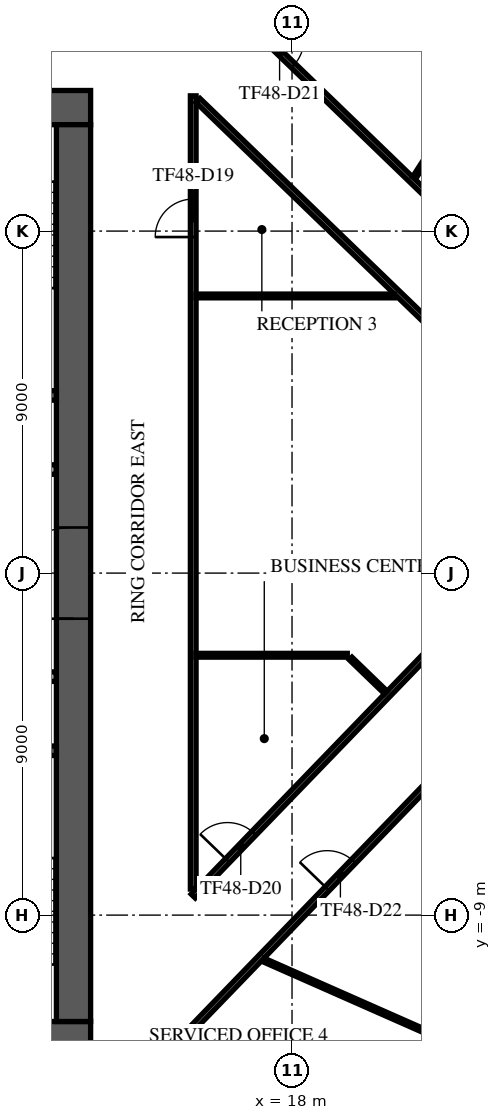
"""IFC4 building model, lengths in metres.
Left out: names, types, materials, properties, quantities, classifications, styles, units other than length and angle.
Written with IfcOpenShell. Run it as: python <this file> out.ifc"""

import sys

from ifc_helpers import new_model, si_unit, direction, frame, frame_2d, origin, place, context, subcontext, project, spatial, rectangle, extrude, element, fill, save


model = new_model("IFC4")
c1 = context("Model", 3, precision=1e-05, world=origin(), true_north=direction((0.0, 1.0)))
c2 = subcontext(c1, "Body", "Model", "MODEL_VIEW")
j1 = project(units=[si_unit("LENGTHUNIT", "METRE"), si_unit("PLANEANGLEUNIT", "RADIAN")], contexts=[c1])
p1 = place(None, origin())
s1 = spatial("IfcSite", under=j1, at=p1, CompositionType="ELEMENT")
p2 = place(p1, origin())
s2 = spatial("IfcBuilding", under=s1, at=p2, CompositionType="ELEMENT")
p3 = place(p2, frame((0.0, 0.0, 205.3)))
s3 = spatial("IfcBuildingStorey", under=s2, at=p3, CompositionType="ELEMENT", Elevation=205.3)
p4 = place(p3, frame((-12.7, 12.25, 0.0), z_axis=(0.0, 0.0, 1.0), x_axis=(1.0, 0.0, 0.0)))
e1 = element("IfcWall", 1, at=p4, inside=s3, PredefinedType="SHEAR", context=c2, shape_type="SweptSolid", body=[
    extrude(rectangle(XDim=25.4, YDim=0.9, at=frame_2d((12.7, 0.0))), origin(), (0.0, 0.0, 1.0), 3.62),
])
p5 = place(p4, frame((11.5, 0.0, 0.0)))
e2 = element("IfcOpeningElement", 2, at=p5, cuts=e1, PredefinedType="OPENING", context=c2, shape_type="SweptSolid", body=[
    extrude(rectangle(XDim=2.4, YDim=2.4, at=frame_2d((1.2, 1.2))), frame((0.0, 0.46, 0.0), z_axis=(0.0, -1.0, 0.0), x_axis=(1.0, 0.0, 0.0)), (0.0, 0.0, 1.0), 0.92),
])
p6 = place(p4, frame((22.325, 0.0, 0.0)))
e3 = element("IfcOpeningElement", 3, at=p6, cuts=e1, PredefinedType="OPENING", context=c2, shape_type="SweptSolid", body=[
    extrude(rectangle(XDim=1.2, YDim=2.1, at=frame_2d((0.6, 1.05))), frame((0.0, 0.46, 0.0), z_axis=(0.0, -1.0, 0.0), x_axis=(1.0, 0.0, 0.0)), (0.0, 0.0, 1.0), 0.92),
])
p7 = place(p4, frame((1.3, 0.0, 0.0)))
e4 = element("IfcOpeningElement", 4, at=p7, cuts=e1, PredefinedType="OPENING", context=c2, shape_type="SweptSolid", body=[
    extrude(rectangle(XDim=1.0, YDim=2.1, at=frame_2d((0.5, 1.05))), frame((0.0, 0.46, 0.0), z_axis=(0.0, -1.0, 0.0), x_axis=(1.0, 0.0, 0.0)), (0.0, 0.0, 1.0), 0.92),
])
p8 = place(p3, frame((-12.7, -12.25, 0.0), z_axis=(0.0, 0.0, 1.0), x_axis=(1.0, 0.0, 0.0)))
e5 = element("IfcWall", 5, at=p8, inside=s3, PredefinedType="SHEAR", context=c2, shape_type="SweptSolid", body=[
    extrude(rectangle(XDim=25.4, YDim=0.9, at=frame_2d((12.7, 0.0))), origin(), (0.0, 0.0, 1.0), 3.62),
])
p9 = place(p8, frame((7.6, 0.0, 0.0)))
e6 = element("IfcOpeningElement", 6, at=p9, cuts=e5, PredefinedType="OPENING", context=c2, shape_type="SweptSolid", body=[
    extrude(rectangle(XDim=2.0, YDim=2.1, at=frame_2d((1.0, 1.05))), frame((0.0, 0.46, 0.0), z_axis=(0.0, -1.0, 0.0), x_axis=(1.0, 0.0, 0.0)), (0.0, 0.0, 1.0), 0.92),
])
p10 = place(p8, frame((17.725, 0.0, 0.0)))
e7 = element("IfcOpeningElement", 7, at=p10, cuts=e5, PredefinedType="OPENING", context=c2, shape_type="SweptSolid", body=[
    extrude(rectangle(XDim=1.2, YDim=2.1, at=frame_2d((0.6, 1.05))), frame((0.0, 0.46, 0.0), z_axis=(0.0, -1.0, 0.0), x_axis=(1.0, 0.0, 0.0)), (0.0, 0.0, 1.0), 0.92),
])
p11 = place(p8, frame((1.875, 0.0, 0.0)))
e8 = element("IfcOpeningElement", 8, at=p11, cuts=e5, PredefinedType="OPENING", context=c2, shape_type="SweptSolid", body=[
    extrude(rectangle(XDim=1.2, YDim=2.1, at=frame_2d((0.6, 1.05))), frame((0.0, 0.46, 0.0), z_axis=(0.0, -1.0, 0.0), x_axis=(1.0, 0.0, 0.0)), (0.0, 0.0, 1.0), 0.92),
])
p12 = place(p8, frame((22.325, 0.0, 0.0)))
e9 = element("IfcOpeningElement", 9, at=p12, cuts=e5, PredefinedType="OPENING", context=c2, shape_type="SweptSolid", body=[
    extrude(rectangle(XDim=1.2, YDim=2.1, at=frame_2d((0.6, 1.05))), frame((0.0, 0.46, 0.0), z_axis=(0.0, -1.0, 0.0), x_axis=(1.0, 0.0, 0.0)), (0.0, 0.0, 1.0), 0.92),
])
p13 = place(p3, frame((12.25, -11.8, 0.0), z_axis=(0.0, 0.0, 1.0), x_axis=(0.0, 1.0, 0.0)))
e10 = element("IfcWall", 10, at=p13, inside=s3, PredefinedType="SHEAR", context=c2, shape_type="SweptSolid", body=[
    extrude(rectangle(XDim=23.6, YDim=0.9, at=frame_2d((11.8, 0.0))), origin(), (0.0, 0.0, 1.0), 3.62),
])
p14 = place(p13, frame((10.6, 0.0, 0.0)))
e11 = element("IfcOpeningElement", 11, at=p14, cuts=e10, PredefinedType="OPENING", context=c2, shape_type="SweptSolid", body=[
    extrude(rectangle(XDim=2.4, YDim=2.4, at=frame_2d((1.2, 1.2))), frame((0.0, 0.46, 0.0), z_axis=(0.0, -1.0, 0.0), x_axis=(1.0, 0.0, 0.0)), (0.0, 0.0, 1.0), 0.92),
])
for number, where, z_axis, x_axis in (
    (12, (8.65, 4.675, 0.0), (0.0, 0.0, 1.0), (1.0, 0.0, 0.0)),
    (13, (8.65, -4.675, 0.0), (0.0, 0.0, 1.0), (1.0, 0.0, 0.0)),
):
    element("IfcWall", number, at=place(p3, frame(where, z_axis=z_axis, x_axis=x_axis)), inside=s3, PredefinedType="SOLIDWALL", context=c2, shape_type="SweptSolid", body=[
        extrude(rectangle(XDim=3.15, YDim=0.25, at=frame_2d((1.575, 0.0))), origin(), (0.0, 0.0, 1.0), 3.62),
    ])
p15 = place(p3, frame((5.63, -2.725, 0.0), z_axis=(0.0, 0.0, 1.0), x_axis=(1.0, 0.0, 0.0)))
e14 = element("IfcWall", 14, at=p15, inside=s3, PredefinedType="PARTITIONING", context=c2, shape_type="SweptSolid", body=[
    extrude(rectangle(XDim=6.165, YDim=0.25, at=frame_2d((3.083, 0.0))), origin(), (0.0, 0.0, 1.0), 3.62),
])
p16 = place(p15, frame((0.745, 0.0, 0.0)))
e15 = element("IfcOpeningElement", 15, at=p16, cuts=e14, PredefinedType="OPENING", context=c2, shape_type="SweptSolid", body=[
    extrude(rectangle(XDim=1.0, YDim=2.1, at=frame_2d((0.5, 1.05))), frame((0.0, 0.135, 0.0), z_axis=(0.0, -1.0, 0.0), x_axis=(1.0, 0.0, 0.0)), (0.0, 0.0, 1.0), 0.27),
])
p17 = place(p15, frame((3.92, 0.0, 0.0)))
e16 = element("IfcOpeningElement", 16, at=p17, cuts=e14, PredefinedType="OPENING", context=c2, shape_type="SweptSolid", body=[
    extrude(rectangle(XDim=0.9, YDim=2.1, at=frame_2d((0.45, 1.05))), frame((0.0, 0.135, 0.0), z_axis=(0.0, -1.0, 0.0), x_axis=(1.0, 0.0, 0.0)), (0.0, 0.0, 1.0), 0.27),
])
p18 = place(p3, frame((8.38, 2.725, 0.0), z_axis=(0.0, 0.0, 1.0), x_axis=(1.0, 0.0, 0.0)))
e17 = element("IfcWall", 17, at=p18, inside=s3, PredefinedType="PARTITIONING", context=c2, shape_type="SweptSolid", body=[
    extrude(rectangle(XDim=3.415, YDim=0.25, at=frame_2d((1.708, 0.0))), origin(), (0.0, 0.0, 1.0), 3.62),
])
p19 = place(p18, frame((1.17, 0.0, 0.0)))
e18 = element("IfcOpeningElement", 18, at=p19, cuts=e17, PredefinedType="OPENING", context=c2, shape_type="SweptSolid", body=[
    extrude(rectangle(XDim=0.9, YDim=2.1, at=frame_2d((0.45, 1.05))), frame((0.0, 0.135, 0.0), z_axis=(0.0, -1.0, 0.0), x_axis=(1.0, 0.0, 0.0)), (0.0, 0.0, 1.0), 0.27),
])
p20 = place(p3, frame((0.749, -34.782, 0.0), z_axis=(0.0, 0.0, 1.0), x_axis=(0.694657553534, 0.719340589233, 0.0)))
e19 = element("IfcWall", 19, at=p20, inside=s3, PredefinedType="STANDARD", context=c2, shape_type="SweptSolid", body=[
    extrude(rectangle(XDim=49.0, YDim=0.6, at=frame_2d((24.5, 0.0))), origin(), (0.0, 0.0, 1.0), 3.62),
])
p21 = place(p20, frame((1.227, 0.0, 0.9)))
e20 = element("IfcOpeningElement", 20, at=p21, cuts=e19, PredefinedType="OPENING", context=c2, shape_type="SweptSolid", body=[
    extrude(rectangle(XDim=2.0, YDim=2.1, at=frame_2d((1.0, 1.05))), frame((0.0, 0.31, 0.0), z_axis=(0.0, -1.0, 0.0), x_axis=(1.0, 0.0, 0.0)), (0.0, 0.0, 1.0), 0.62),
])
p22 = place(p20, frame((5.682, 0.0, 0.9)))
e21 = element("IfcOpeningElement", 21, at=p22, cuts=e19, PredefinedType="OPENING", context=c2, shape_type="SweptSolid", body=[
    extrude(rectangle(XDim=2.0, YDim=2.1, at=frame_2d((1.0, 1.05))), frame((0.0, 0.31, 0.0), z_axis=(0.0, -1.0, 0.0), x_axis=(1.0, 0.0, 0.0)), (0.0, 0.0, 1.0), 0.62),
])
p23 = place(p20, frame((10.136, 0.0, 0.9)))
e22 = element("IfcOpeningElement", 22, at=p23, cuts=e19, PredefinedType="OPENING", context=c2, shape_type="SweptSolid", body=[
    extrude(rectangle(XDim=2.0, YDim=2.1, at=frame_2d((1.0, 1.05))), frame((0.0, 0.31, 0.0), z_axis=(0.0, -1.0, 0.0), x_axis=(1.0, 0.0, 0.0)), (0.0, 0.0, 1.0), 0.62),
])
p24 = place(p20, frame((14.591, 0.0, 0.9)))
e23 = element("IfcOpeningElement", 23, at=p24, cuts=e19, PredefinedType="OPENING", context=c2, shape_type="SweptSolid", body=[
    extrude(rectangle(XDim=2.0, YDim=2.1, at=frame_2d((1.0, 1.05))), frame((0.0, 0.31, 0.0), z_axis=(0.0, -1.0, 0.0), x_axis=(1.0, 0.0, 0.0)), (0.0, 0.0, 1.0), 0.62),
])
p25 = place(p20, frame((19.045, 0.0, 0.9)))
e24 = element("IfcOpeningElement", 24, at=p25, cuts=e19, PredefinedType="OPENING", context=c2, shape_type="SweptSolid", body=[
    extrude(rectangle(XDim=2.0, YDim=2.1, at=frame_2d((1.0, 1.05))), frame((0.0, 0.31, 0.0), z_axis=(0.0, -1.0, 0.0), x_axis=(1.0, 0.0, 0.0)), (0.0, 0.0, 1.0), 0.62),
])
p26 = place(p20, frame((23.5, 0.0, 0.9)))
e25 = element("IfcOpeningElement", 25, at=p26, cuts=e19, PredefinedType="OPENING", context=c2, shape_type="SweptSolid", body=[
    extrude(rectangle(XDim=2.0, YDim=2.1, at=frame_2d((1.0, 1.05))), frame((0.0, 0.31, 0.0), z_axis=(0.0, -1.0, 0.0), x_axis=(1.0, 0.0, 0.0)), (0.0, 0.0, 1.0), 0.62),
])
p27 = place(p20, frame((27.955, 0.0, 0.9)))
e26 = element("IfcOpeningElement", 26, at=p27, cuts=e19, PredefinedType="OPENING", context=c2, shape_type="SweptSolid", body=[
    extrude(rectangle(XDim=2.0, YDim=2.1, at=frame_2d((1.0, 1.05))), frame((0.0, 0.31, 0.0), z_axis=(0.0, -1.0, 0.0), x_axis=(1.0, 0.0, 0.0)), (0.0, 0.0, 1.0), 0.62),
])
p28 = place(p20, frame((32.409, 0.0, 0.9)))
e27 = element("IfcOpeningElement", 27, at=p28, cuts=e19, PredefinedType="OPENING", context=c2, shape_type="SweptSolid", body=[
    extrude(rectangle(XDim=2.0, YDim=2.1, at=frame_2d((1.0, 1.05))), frame((0.0, 0.31, 0.0), z_axis=(0.0, -1.0, 0.0), x_axis=(1.0, 0.0, 0.0)), (0.0, 0.0, 1.0), 0.62),
])
p29 = place(p20, frame((36.864, 0.0, 0.9)))
e28 = element("IfcOpeningElement", 28, at=p29, cuts=e19, PredefinedType="OPENING", context=c2, shape_type="SweptSolid", body=[
    extrude(rectangle(XDim=2.0, YDim=2.1, at=frame_2d((1.0, 1.05))), frame((0.0, 0.31, 0.0), z_axis=(0.0, -1.0, 0.0), x_axis=(1.0, 0.0, 0.0)), (0.0, 0.0, 1.0), 0.62),
])
p30 = place(p20, frame((41.318, 0.0, 0.9)))
e29 = element("IfcOpeningElement", 29, at=p30, cuts=e19, PredefinedType="OPENING", context=c2, shape_type="SweptSolid", body=[
    extrude(rectangle(XDim=2.0, YDim=2.1, at=frame_2d((1.0, 1.05))), frame((0.0, 0.31, 0.0), z_axis=(0.0, -1.0, 0.0), x_axis=(1.0, 0.0, 0.0)), (0.0, 0.0, 1.0), 0.62),
])
p31 = place(p20, frame((45.773, 0.0, 0.9)))
e30 = element("IfcOpeningElement", 30, at=p31, cuts=e19, PredefinedType="OPENING", context=c2, shape_type="SweptSolid", body=[
    extrude(rectangle(XDim=2.0, YDim=2.1, at=frame_2d((1.0, 1.05))), frame((0.0, 0.31, 0.0), z_axis=(0.0, -1.0, 0.0), x_axis=(1.0, 0.0, 0.0)), (0.0, 0.0, 1.0), 0.62),
])
p32 = place(p3, frame((34.658, 7.819, 0.0), z_axis=(0.0, 0.0, 1.0), x_axis=(-0.719340729741, 0.694657408034, 0.0)))
e31 = element("IfcWall", 31, at=p32, inside=s3, PredefinedType="STANDARD", context=c2, shape_type="SweptSolid", body=[
    extrude(rectangle(XDim=39.0, YDim=0.6, at=frame_2d((19.5, 0.0))), origin(), (0.0, 0.0, 1.0), 3.62),
])
p33 = place(p32, frame((1.217, 0.0, 0.9)))
e32 = element("IfcOpeningElement", 32, at=p33, cuts=e31, PredefinedType="OPENING", context=c2, shape_type="SweptSolid", body=[
    extrude(rectangle(XDim=1.9, YDim=2.1, at=frame_2d((0.95, 1.05))), frame((0.0, 0.31, 0.0), z_axis=(0.0, -1.0, 0.0), x_axis=(1.0, 0.0, 0.0)), (0.0, 0.0, 1.0), 0.62),
])
p34 = place(p32, frame((5.55, 0.0, 0.9)))
e33 = element("IfcOpeningElement", 33, at=p34, cuts=e31, PredefinedType="OPENING", context=c2, shape_type="SweptSolid", body=[
    extrude(rectangle(XDim=1.9, YDim=2.1, at=frame_2d((0.95, 1.05))), frame((0.0, 0.31, 0.0), z_axis=(0.0, -1.0, 0.0), x_axis=(1.0, 0.0, 0.0)), (0.0, 0.0, 1.0), 0.62),
])
p35 = place(p32, frame((9.883, 0.0, 0.9)))
e34 = element("IfcOpeningElement", 34, at=p35, cuts=e31, PredefinedType="OPENING", context=c2, shape_type="SweptSolid", body=[
    extrude(rectangle(XDim=1.9, YDim=2.1, at=frame_2d((0.95, 1.05))), frame((0.0, 0.31, 0.0), z_axis=(0.0, -1.0, 0.0), x_axis=(1.0, 0.0, 0.0)), (0.0, 0.0, 1.0), 0.62),
])
p36 = place(p32, frame((14.217, 0.0, 0.9)))
e35 = element("IfcOpeningElement", 35, at=p36, cuts=e31, PredefinedType="OPENING", context=c2, shape_type="SweptSolid", body=[
    extrude(rectangle(XDim=1.9, YDim=2.1, at=frame_2d((0.95, 1.05))), frame((0.0, 0.31, 0.0), z_axis=(0.0, -1.0, 0.0), x_axis=(1.0, 0.0, 0.0)), (0.0, 0.0, 1.0), 0.62),
])
p37 = place(p32, frame((18.55, 0.0, 0.9)))
e36 = element("IfcOpeningElement", 36, at=p37, cuts=e31, PredefinedType="OPENING", context=c2, shape_type="SweptSolid", body=[
    extrude(rectangle(XDim=1.9, YDim=2.1, at=frame_2d((0.95, 1.05))), frame((0.0, 0.31, 0.0), z_axis=(0.0, -1.0, 0.0), x_axis=(1.0, 0.0, 0.0)), (0.0, 0.0, 1.0), 0.62),
])
p38 = place(p32, frame((22.883, 0.0, 0.9)))
e37 = element("IfcOpeningElement", 37, at=p38, cuts=e31, PredefinedType="OPENING", context=c2, shape_type="SweptSolid", body=[
    extrude(rectangle(XDim=1.9, YDim=2.1, at=frame_2d((0.95, 1.05))), frame((0.0, 0.31, 0.0), z_axis=(0.0, -1.0, 0.0), x_axis=(1.0, 0.0, 0.0)), (0.0, 0.0, 1.0), 0.62),
])
p39 = place(p32, frame((27.217, 0.0, 0.9)))
e38 = element("IfcOpeningElement", 38, at=p39, cuts=e31, PredefinedType="OPENING", context=c2, shape_type="SweptSolid", body=[
    extrude(rectangle(XDim=1.9, YDim=2.1, at=frame_2d((0.95, 1.05))), frame((0.0, 0.31, 0.0), z_axis=(0.0, -1.0, 0.0), x_axis=(1.0, 0.0, 0.0)), (0.0, 0.0, 1.0), 0.62),
])
p40 = place(p32, frame((31.55, 0.0, 0.9)))
e39 = element("IfcOpeningElement", 39, at=p40, cuts=e31, PredefinedType="OPENING", context=c2, shape_type="SweptSolid", body=[
    extrude(rectangle(XDim=1.9, YDim=2.1, at=frame_2d((0.95, 1.05))), frame((0.0, 0.31, 0.0), z_axis=(0.0, -1.0, 0.0), x_axis=(1.0, 0.0, 0.0)), (0.0, 0.0, 1.0), 0.62),
])
p41 = place(p32, frame((35.883, 0.0, 0.9)))
e40 = element("IfcOpeningElement", 40, at=p41, cuts=e31, PredefinedType="OPENING", context=c2, shape_type="SweptSolid", body=[
    extrude(rectangle(XDim=1.9, YDim=2.1, at=frame_2d((0.95, 1.05))), frame((0.0, 0.31, 0.0), z_axis=(0.0, -1.0, 0.0), x_axis=(1.0, 0.0, 0.0)), (0.0, 0.0, 1.0), 0.62),
])
p42 = place(p3, frame((0.977, -26.89, 0.0), z_axis=(0.0, 0.0, 1.0), x_axis=(0.694659509326, 0.719338700546, 0.0)))
e41 = element("IfcWall", 41, at=p42, inside=s3, PredefinedType="PARTITIONING", context=c2, shape_type="SweptSolid", body=[
    extrude(rectangle(XDim=37.404, YDim=0.15, at=frame_2d((18.702, 0.0))), origin(), (0.0, 0.0, 1.0), 3.17),
])
p43 = place(p42, frame((10.017, 0.0, 0.0)))
e42 = element("IfcOpeningElement", 42, at=p43, cuts=e41, PredefinedType="OPENING", context=c2, shape_type="SweptSolid", body=[
    extrude(rectangle(XDim=1.0, YDim=2.1, at=frame_2d((0.5, 1.05))), frame((0.0, 0.085, 0.0), z_axis=(0.0, -1.0, 0.0), x_axis=(1.0, 0.0, 0.0)), (0.0, 0.0, 1.0), 0.17),
])
p44 = place(p42, frame((16.416, 0.0, 0.0)))
e43 = element("IfcOpeningElement", 43, at=p44, cuts=e41, PredefinedType="OPENING", context=c2, shape_type="SweptSolid", body=[
    extrude(rectangle(XDim=1.0, YDim=2.1, at=frame_2d((0.5, 1.05))), frame((0.0, 0.085, 0.0), z_axis=(0.0, -1.0, 0.0), x_axis=(1.0, 0.0, 0.0)), (0.0, 0.0, 1.0), 0.17),
])
p45 = place(p42, frame((25.838, 0.0, 0.0)))
e44 = element("IfcOpeningElement", 44, at=p45, cuts=e41, PredefinedType="OPENING", context=c2, shape_type="SweptSolid", body=[
    extrude(rectangle(XDim=1.0, YDim=2.1, at=frame_2d((0.5, 1.05))), frame((0.0, 0.085, 0.0), z_axis=(0.0, -1.0, 0.0), x_axis=(1.0, 0.0, 0.0)), (0.0, 0.0, 1.0), 0.17),
])
p46 = place(p42, frame((31.566, 0.0, 0.0)))
e45 = element("IfcOpeningElement", 45, at=p46, cuts=e41, PredefinedType="OPENING", context=c2, shape_type="SweptSolid", body=[
    extrude(rectangle(XDim=1.0, YDim=2.1, at=frame_2d((0.5, 1.05))), frame((0.0, 0.085, 0.0), z_axis=(0.0, -1.0, 0.0), x_axis=(1.0, 0.0, 0.0)), (0.0, 0.0, 1.0), 0.17),
])
p47 = place(p3, frame((5.597, 25.362, 0.0), z_axis=(0.0, 0.0, 1.0), x_axis=(0.719350067003, -0.69464773886, 0.0)))
e46 = element("IfcWall", 46, at=p47, inside=s3, PredefinedType="PARTITIONING", context=c2, shape_type="SweptSolid", body=[
    extrude(rectangle(XDim=27.258, YDim=0.15, at=frame_2d((13.629, 0.0))), origin(), (0.0, 0.0, 1.0), 3.17),
])
p48 = place(p47, frame((11.017, 0.0, 0.0)))
e47 = element("IfcOpeningElement", 47, at=p48, cuts=e46, PredefinedType="OPENING", context=c2, shape_type="SweptSolid", body=[
    extrude(rectangle(XDim=1.0, YDim=2.1, at=frame_2d((0.5, 1.05))), frame((0.0, 0.085, 0.0), z_axis=(0.0, -1.0, 0.0), x_axis=(1.0, 0.0, 0.0)), (0.0, 0.0, 1.0), 0.17),
])
p49 = place(p47, frame((16.287, 0.0, 0.0)))
e48 = element("IfcOpeningElement", 48, at=p49, cuts=e46, PredefinedType="OPENING", context=c2, shape_type="SweptSolid", body=[
    extrude(rectangle(XDim=1.0, YDim=2.1, at=frame_2d((0.5, 1.05))), frame((0.0, 0.085, 0.0), z_axis=(0.0, -1.0, 0.0), x_axis=(1.0, 0.0, 0.0)), (0.0, 0.0, 1.0), 0.17),
])
p50 = place(p47, frame((24.435, 0.0, 0.0)))
e49 = element("IfcOpeningElement", 49, at=p50, cuts=e46, PredefinedType="OPENING", context=c2, shape_type="SweptSolid", body=[
    extrude(rectangle(XDim=1.8, YDim=2.1, at=frame_2d((0.9, 1.05))), frame((0.0, 0.085, 0.0), z_axis=(0.0, -1.0, 0.0), x_axis=(1.0, 0.0, 0.0)), (0.0, 0.0, 1.0), 0.17),
])
p51 = place(p3, frame((15.4, -8.5, 0.0), z_axis=(0.0, 0.0, 1.0), x_axis=(0.694668375929, 0.719330138034, 0.0)))
e50 = element("IfcWall", 50, at=p51, inside=s3, PredefinedType="PARTITIONING", context=c2, shape_type="SweptSolid", body=[
    extrude(rectangle(XDim=14.156, YDim=0.15, at=frame_2d((7.078, 0.0))), origin(), (0.0, 0.0, 1.0), 3.17),
])
p52 = place(p51, frame((1.3, 0.0, 0.0)))
e51 = element("IfcOpeningElement", 51, at=p52, cuts=e50, PredefinedType="OPENING", context=c2, shape_type="SweptSolid", body=[
    extrude(rectangle(XDim=1.0, YDim=2.1, at=frame_2d((0.5, 1.05))), frame((0.0, 0.085, 0.0), z_axis=(0.0, -1.0, 0.0), x_axis=(1.0, 0.0, 0.0)), (0.0, 0.0, 1.0), 0.17),
])
p53 = place(p3, frame((15.4, -8.314, 0.0), z_axis=(0.0, 0.0, 1.0), x_axis=(0.0, 1.0, 0.0)))
e52 = element("IfcWall", 52, at=p53, inside=s3, PredefinedType="PARTITIONING", context=c2, shape_type="SweptSolid", body=[
    extrude(rectangle(XDim=20.874, YDim=0.15, at=frame_2d((10.437, 0.0))), origin(), (0.0, 0.0, 1.0), 3.17),
])
p54 = place(p53, frame((17.158, 0.0, 0.0)))
e53 = element("IfcOpeningElement", 53, at=p54, cuts=e52, PredefinedType="OPENING", context=c2, shape_type="SweptSolid", body=[
    extrude(rectangle(XDim=1.0, YDim=2.1, at=frame_2d((0.5, 1.05))), frame((0.0, 0.085, 0.0), z_axis=(0.0, -1.0, 0.0), x_axis=(1.0, 0.0, 0.0)), (0.0, 0.0, 1.0), 0.17),
])
p55 = place(p3, frame((15.527, 12.436, 0.0), z_axis=(0.0, 0.0, 1.0), x_axis=(0.719374261493, -0.694622683118, 0.0)))
e54 = element("IfcWall", 54, at=p55, inside=s3, PredefinedType="PARTITIONING", context=c2, shape_type="SweptSolid", body=[
    extrude(rectangle(XDim=11.136, YDim=0.15, at=frame_2d((5.568, 0.0))), origin(), (0.0, 0.0, 1.0), 3.17),
])
p56 = place(p3, frame((15.475, -2.162, 0.0), z_axis=(0.0, 0.0, 1.0), x_axis=(1.0, 0.0, 0.0)))
e55 = element("IfcWall", 55, at=p56, inside=s3, PredefinedType="PARTITIONING", context=c2, shape_type="SweptSolid", body=[
    extrude(rectangle(XDim=3.979, YDim=0.1, at=frame_2d((1.99, 0.0))), origin(), (0.0, 0.0, 1.0), 3.62),
])
p57 = place(p3, frame((15.475, 7.293, 0.0), z_axis=(0.0, 0.0, 1.0), x_axis=(1.0, 0.0, 0.0)))
e56 = element("IfcWall", 56, at=p57, inside=s3, PredefinedType="PARTITIONING", context=c2, shape_type="SweptSolid", body=[
    extrude(rectangle(XDim=5.218, YDim=0.1, at=frame_2d((2.609, 0.0))), origin(), (0.0, 0.0, 1.0), 3.17),
])
p58 = place(p3, frame((17.244, -10.178, 0.0), z_axis=(0.0, 0.0, 1.0), x_axis=(0.914761015663, -0.403995401239, 0.0)))
e57 = element("IfcWall", 57, at=p58, inside=s3, PredefinedType="PARTITIONING", context=c2, shape_type="SweptSolid", body=[
    extrude(rectangle(XDim=5.245, YDim=0.1, at=frame_2d((2.623, 0.0))), origin(), (0.0, 0.0, 1.0), 2.97),
])
p59 = place(p3, frame((19.543, -2.248, 0.0), z_axis=(0.0, 0.0, 1.0), x_axis=(0.719136791041, -0.694868531286, 0.0)))
e58 = element("IfcWall", 58, at=p59, inside=s3, PredefinedType="PARTITIONING", context=c2, shape_type="SweptSolid", body=[
    extrude(rectangle(XDim=1.288, YDim=0.1, at=frame_2d((0.644, 0.0))), origin(), (0.0, 0.0, 1.0), 3.62),
])
p60 = place(p3, frame((21.213, 10.4, 0.0), z_axis=(0.0, 0.0, 1.0), x_axis=(0.542191446755, 0.840254982172, 0.0)))
e59 = element("IfcWall", 59, at=p60, inside=s3, PredefinedType="PARTITIONING", context=c2, shape_type="SweptSolid", body=[
    extrude(rectangle(XDim=7.319, YDim=0.1, at=frame_2d((3.66, 0.0))), origin(), (0.0, 0.0, 1.0), 2.97),
])
p61 = place(p14, origin())
e60 = element("IfcDoor", 60, at=p61, inside=s3, OperationType="SINGLE_SWING_LEFT", PredefinedType="DOOR", context=c2, shape_type="SweptSolid", body=[
    extrude(rectangle(XDim=2.4, YDim=2.4, at=frame_2d((1.2, 1.2))), frame((0.0, 0.025, 0.0), z_axis=(0.0, -1.0, 0.0), x_axis=(1.0, 0.0, 0.0)), (0.0, 0.0, 1.0), 0.05),
])
fill(e11, e60)
p62 = place(p54, frame((1.0, 0.0, 0.0), z_axis=(0.0, 0.0, 1.0), x_axis=(-1.0, 0.0, 0.0)))
e61 = element("IfcDoor", 61, at=p62, inside=s3, OperationType="SINGLE_SWING_RIGHT", PredefinedType="DOOR", context=c2, shape_type="SweptSolid", body=[
    extrude(rectangle(XDim=1.0, YDim=2.1, at=frame_2d((0.5, 1.05))), frame((0.0, 0.025, 0.0), z_axis=(0.0, -1.0, 0.0), x_axis=(1.0, 0.0, 0.0)), (0.0, 0.0, 1.0), 0.05),
])
fill(e53, e61)
p63 = place(p52, origin())
e62 = element("IfcDoor", 62, at=p63, inside=s3, OperationType="SINGLE_SWING_RIGHT", PredefinedType="DOOR", context=c2, shape_type="SweptSolid", body=[
    extrude(rectangle(XDim=1.0, YDim=2.1, at=frame_2d((0.5, 1.05))), frame((0.0, 0.025, 0.0), z_axis=(0.0, -1.0, 0.0), x_axis=(1.0, 0.0, 0.0)), (0.0, 0.0, 1.0), 0.05),
])
fill(e51, e62)
p64 = place(p49, origin())
e63 = element("IfcDoor", 63, at=p64, inside=s3, OperationType="SINGLE_SWING_LEFT", PredefinedType="DOOR", context=c2, shape_type="SweptSolid", body=[
    extrude(rectangle(XDim=1.0, YDim=2.1, at=frame_2d((0.5, 1.05))), frame((0.0, 0.025, 0.0), z_axis=(0.0, -1.0, 0.0), x_axis=(1.0, 0.0, 0.0)), (0.0, 0.0, 1.0), 0.05),
])
fill(e48, e63)
p65 = place(p45, frame((1.0, 0.0, 0.0), z_axis=(0.0, 0.0, 1.0), x_axis=(-1.0, 0.0, 0.0)))
e64 = element("IfcDoor", 64, at=p65, inside=s3, OperationType="SINGLE_SWING_RIGHT", PredefinedType="DOOR", context=c2, shape_type="SweptSolid", body=[
    extrude(rectangle(XDim=1.0, YDim=2.1, at=frame_2d((0.5, 1.05))), frame((0.0, 0.025, 0.0), z_axis=(0.0, -1.0, 0.0), x_axis=(1.0, 0.0, 0.0)), (0.0, 0.0, 1.0), 0.05),
])
fill(e44, e64)
save(model, sys.argv[1])
